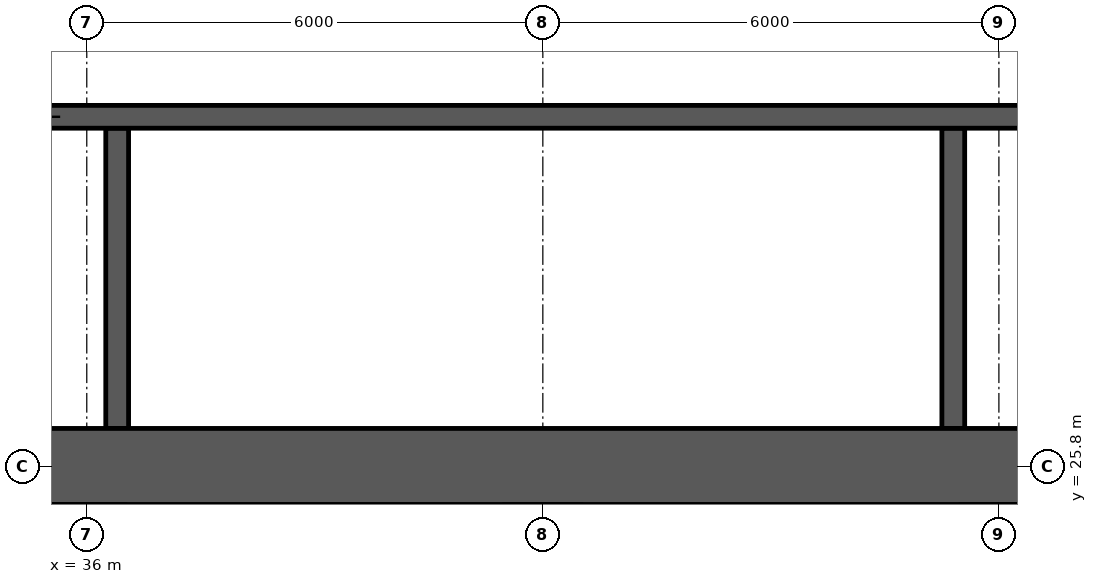
"""IFC4 building model, lengths in metres.
Left out: names, types, materials, properties, quantities, classifications, styles, units other than length and angle.
Written with IfcOpenShell. Run it as: python <this file> out.ifc"""

import sys

from ifc_helpers import new_model, si_unit, direction, frame, frame_2d, origin, place, context, subcontext, project, spatial, rectangle, extrude, element, fill, save


model = new_model("IFC4")
c1 = context("Model", 3, precision=1e-05, world=origin(), true_north=direction((0.0, 1.0)))
c2 = subcontext(c1, "Body", "Model", "MODEL_VIEW")
j1 = project(units=[si_unit("LENGTHUNIT", "METRE"), si_unit("PLANEANGLEUNIT", "RADIAN")], contexts=[c1])
p1 = place(None, origin())
s1 = spatial("IfcSite", under=j1, at=p1, CompositionType="ELEMENT")
p2 = place(p1, origin())
s2 = spatial("IfcBuilding", under=s1, at=p2, CompositionType="ELEMENT")
p3 = place(p2, frame((0.0, 0.0, 35.2)))
s3 = spatial("IfcBuildingStorey", under=s2, at=p3, CompositionType="ELEMENT", Elevation=35.2)
p4 = place(p3, frame((18.0, 25.8, 0.0), z_axis=(0.0, 0.0, 1.0), x_axis=(1.0, 0.0, 0.0)))
e1 = element("IfcWall", 1, at=p4, inside=s3, PredefinedType="SHEAR", context=c2, shape_type="SweptSolid", body=[
    extrude(rectangle(XDim=48.0, YDim=1.0, at=frame_2d((24.0, 0.0))), origin(), (0.0, 0.0, 1.0), 3.75),
])
p5 = place(p3, frame((18.5, 30.4, 0.0), z_axis=(0.0, 0.0, 1.0), x_axis=(1.0, 0.0, 0.0)))
e2 = element("IfcWall", 2, at=p5, inside=s3, PredefinedType="SHEAR", context=c2, shape_type="SweptSolid", body=[
    extrude(rectangle(XDim=47.0, YDim=0.3, at=frame_2d((23.5, 0.0))), origin(), (0.0, 0.0, 1.0), 3.75),
])
p6 = place(p5, frame((0.4, 0.0, 0.0)))
e3 = element("IfcOpeningElement", 3, at=p6, cuts=e2, PredefinedType="OPENING", context=c2, shape_type="SweptSolid", body=[
    extrude(rectangle(XDim=1.0, YDim=2.1, at=frame_2d((0.5, 1.05))), frame((0.0, 0.16, 0.0), z_axis=(0.0, -1.0, 0.0), x_axis=(1.0, 0.0, 0.0)), (0.0, 0.0, 1.0), 0.32),
])
p7 = place(p5, frame((45.6, 0.0, 0.0)))
e4 = element("IfcOpeningElement", 4, at=p7, cuts=e2, PredefinedType="OPENING", context=c2, shape_type="SweptSolid", body=[
    extrude(rectangle(XDim=1.0, YDim=2.1, at=frame_2d((0.5, 1.05))), frame((0.0, 0.16, 0.0), z_axis=(0.0, -1.0, 0.0), x_axis=(1.0, 0.0, 0.0)), (0.0, 0.0, 1.0), 0.32),
])
p8 = place(p5, frame((8.25, 0.0, 0.0)))
e5 = element("IfcOpeningElement", 5, at=p8, cuts=e2, PredefinedType="OPENING", context=c2, shape_type="SweptSolid", body=[
    extrude(rectangle(XDim=1.1, YDim=2.1, at=frame_2d((0.55, 1.05))), frame((0.0, 0.16, 0.0), z_axis=(0.0, -1.0, 0.0), x_axis=(1.0, 0.0, 0.0)), (0.0, 0.0, 1.0), 0.32),
])
p9 = place(p5, frame((10.85, 0.0, 0.0)))
e6 = element("IfcOpeningElement", 6, at=p9, cuts=e2, PredefinedType="OPENING", context=c2, shape_type="SweptSolid", body=[
    extrude(rectangle(XDim=1.1, YDim=2.1, at=frame_2d((0.55, 1.05))), frame((0.0, 0.16, 0.0), z_axis=(0.0, -1.0, 0.0), x_axis=(1.0, 0.0, 0.0)), (0.0, 0.0, 1.0), 0.32),
])
p10 = place(p5, frame((13.45, 0.0, 0.0)))
e7 = element("IfcOpeningElement", 7, at=p10, cuts=e2, PredefinedType="OPENING", context=c2, shape_type="SweptSolid", body=[
    extrude(rectangle(XDim=1.1, YDim=2.1, at=frame_2d((0.55, 1.05))), frame((0.0, 0.16, 0.0), z_axis=(0.0, -1.0, 0.0), x_axis=(1.0, 0.0, 0.0)), (0.0, 0.0, 1.0), 0.32),
])
p11 = place(p5, frame((16.05, 0.0, 0.0)))
e8 = element("IfcOpeningElement", 8, at=p11, cuts=e2, PredefinedType="OPENING", context=c2, shape_type="SweptSolid", body=[
    extrude(rectangle(XDim=1.1, YDim=2.1, at=frame_2d((0.55, 1.05))), frame((0.0, 0.16, 0.0), z_axis=(0.0, -1.0, 0.0), x_axis=(1.0, 0.0, 0.0)), (0.0, 0.0, 1.0), 0.32),
])
p12 = place(p5, frame((30.117, 0.0, 0.0)))
e9 = element("IfcOpeningElement", 9, at=p12, cuts=e2, PredefinedType="OPENING", context=c2, shape_type="SweptSolid", body=[
    extrude(rectangle(XDim=1.1, YDim=2.1, at=frame_2d((0.55, 1.05))), frame((0.0, 0.16, 0.0), z_axis=(0.0, -1.0, 0.0), x_axis=(1.0, 0.0, 0.0)), (0.0, 0.0, 1.0), 0.32),
])
p13 = place(p5, frame((33.65, 0.0, 0.0)))
e10 = element("IfcOpeningElement", 10, at=p13, cuts=e2, PredefinedType="OPENING", context=c2, shape_type="SweptSolid", body=[
    extrude(rectangle(XDim=1.1, YDim=2.1, at=frame_2d((0.55, 1.05))), frame((0.0, 0.16, 0.0), z_axis=(0.0, -1.0, 0.0), x_axis=(1.0, 0.0, 0.0)), (0.0, 0.0, 1.0), 0.32),
])
p14 = place(p5, frame((37.183, 0.0, 0.0)))
e11 = element("IfcOpeningElement", 11, at=p14, cuts=e2, PredefinedType="OPENING", context=c2, shape_type="SweptSolid", body=[
    extrude(rectangle(XDim=1.1, YDim=2.1, at=frame_2d((0.55, 1.05))), frame((0.0, 0.16, 0.0), z_axis=(0.0, -1.0, 0.0), x_axis=(1.0, 0.0, 0.0)), (0.0, 0.0, 1.0), 0.32),
])
for number, where, z_axis, x_axis in (
    (12, (36.4, 26.3, 0.0), (0.0, 0.0, 1.0), (0.0, 1.0, 0.0)),
    (13, (47.4, 26.3, 0.0), (0.0, 0.0, 1.0), (0.0, 1.0, 0.0)),
):
    element("IfcWall", number, at=place(p3, frame(where, z_axis=z_axis, x_axis=x_axis)), inside=s3, PredefinedType="SHEAR", context=c2, shape_type="SweptSolid", body=[
        extrude(rectangle(XDim=3.95, YDim=0.3, at=frame_2d((1.975, 0.0))), origin(), (0.0, 0.0, 1.0), 3.75),
    ])
p15 = place(p3, frame((38.81, 14.9, 0.0), z_axis=(0.0, 0.0, 1.0), x_axis=(0.0, 1.0, 0.0)))
e14 = element("IfcWall", 14, at=p15, inside=s3, PredefinedType="PARTITIONING", context=c2, shape_type="SweptSolid", body=[
    extrude(rectangle(XDim=10.4, YDim=0.15, at=frame_2d((5.2, 0.0))), origin(), (0.0, 0.0, 1.0), 3.3),
])
p16 = place(p11, origin())
e15 = element("IfcDoor", 15, at=p16, inside=s3, OperationType="DOUBLE_DOOR_SLIDING", PredefinedType="DOOR", context=c2, shape_type="SweptSolid", body=[
    extrude(rectangle(XDim=1.1, YDim=2.1, at=frame_2d((0.55, 1.05))), frame((0.0, 0.025, 0.0), z_axis=(0.0, -1.0, 0.0), x_axis=(1.0, 0.0, 0.0)), (0.0, 0.0, 1.0), 0.05),
])
fill(e8, e15)
save(model, sys.argv[1])
